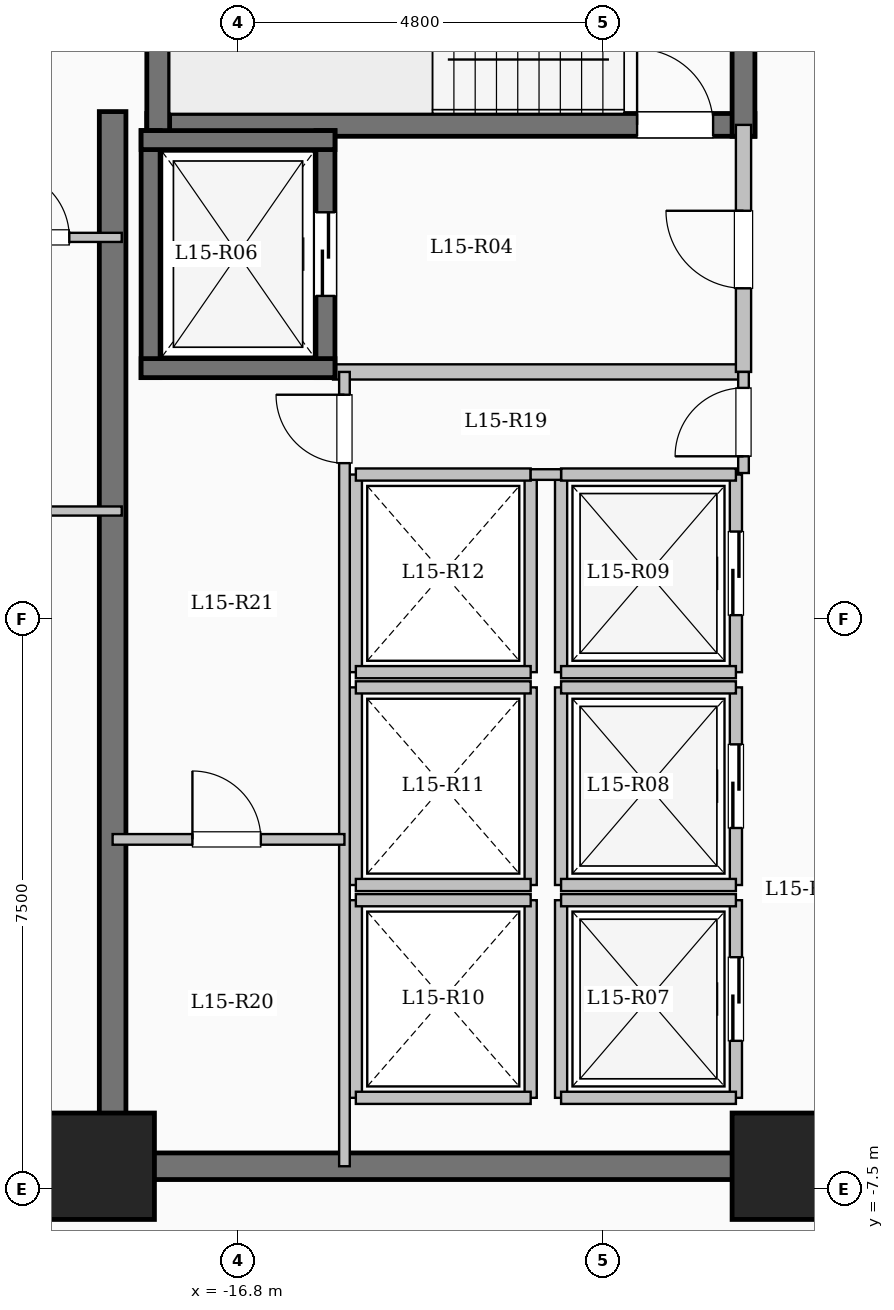
"""IFC4 building model, lengths in metres.
Left out: names, types, materials, properties, quantities, classifications, styles, units other than length and angle.
Written with IfcOpenShell. Run it as: python <this file> out.ifc"""

import sys

from ifc_helpers import new_model, si_unit, direction, frame, frame_2d, origin, origin_2d, place, context, subcontext, project, spatial, rectangle, extrude, element, fill, save


model = new_model("IFC4")
c1 = context("Model", 3, precision=1e-05, world=origin(), true_north=direction((0.0, 1.0)))
c2 = subcontext(c1, "Body", "Model", "MODEL_VIEW")
j1 = project(units=[si_unit("LENGTHUNIT", "METRE"), si_unit("PLANEANGLEUNIT", "RADIAN")], contexts=[c1])
p1 = place(None, origin())
s1 = spatial("IfcSite", under=j1, at=p1, CompositionType="ELEMENT")
p2 = place(p1, origin())
s2 = spatial("IfcBuilding", under=s1, at=p2, CompositionType="ELEMENT")
p3 = place(p2, frame((0.0, 0.0, 57.5)))
s3 = spatial("IfcBuildingStorey", under=s2, at=p3, CompositionType="ELEMENT", Elevation=57.5)
for number, where, z_axis, x_axis in (
    (1, (-9.6, -7.2, 0.0), (0.0, 0.0, 1.0), (1.0, 0.0, 0.0)),
    (2, (-18.6, -7.2, 0.0), (0.0, 0.0, 1.0), (1.0, 0.0, 0.0)),
):
    element("IfcColumn", number, at=place(p3, frame(where, z_axis=z_axis, x_axis=x_axis)), inside=s3, PredefinedType="COLUMN", context=c2, shape_type="SweptSolid", body=[
        extrude(rectangle(XDim=1.4, YDim=1.4, at=origin_2d()), origin(), (0.0, 0.0, 1.0), 3.35),
    ])
p4 = place(p3, frame((-18.0, 6.5, 0.0), z_axis=(0.0, 0.0, 1.0), x_axis=(1.0, 0.0, 0.0)))
e3 = element("IfcWall", 3, at=p4, inside=s3, PredefinedType="SHEAR", context=c2, shape_type="SweptSolid", body=[
    extrude(rectangle(XDim=8.0, YDim=0.3, at=frame_2d((4.0, 0.0))), origin(), (0.0, 0.0, 1.0), 3.35),
])
p5 = place(p4, frame((6.45, 0.0, 0.0)))
e4 = element("IfcOpeningElement", 4, at=p5, cuts=e3, PredefinedType="OPENING", context=c2, shape_type="SweptSolid", body=[
    extrude(rectangle(XDim=1.0, YDim=2.15, at=frame_2d((0.5, 1.075))), frame((0.0, 0.16, 0.0), z_axis=(0.0, -1.0, 0.0), x_axis=(1.0, 0.0, 0.0)), (0.0, 0.0, 1.0), 0.32),
])
for number, where, z_axis, x_axis in (
    (5, (-17.85, 6.35, 0.0), (0.0, 0.0, 1.0), (0.0, 1.0, 0.0)),
    (6, (-10.15, 6.35, 0.0), (0.0, 0.0, 1.0), (0.0, 1.0, 0.0)),
):
    element("IfcWall", number, at=place(p3, frame(where, z_axis=z_axis, x_axis=x_axis)), inside=s3, PredefinedType="SHEAR", context=c2, shape_type="SweptSolid", body=[
        extrude(rectangle(XDim=3.59, YDim=0.3, at=frame_2d((1.795, 0.0))), origin(), (0.0, 0.0, 1.0), 3.35),
    ])
p6 = place(p3, frame((-15.55, 3.25, 0.0), z_axis=(0.0, 0.0, 1.0), x_axis=(1.0, 0.0, 0.0)))
e7 = element("IfcWall", 7, at=p6, inside=s3, PredefinedType="SOLIDWALL", context=c2, shape_type="SweptSolid", body=[
    extrude(rectangle(XDim=5.4, YDim=0.2, at=frame_2d((2.7, 0.0))), origin(), (0.0, 0.0, 1.0), 3.1),
])
p7 = place(p3, frame((-10.15, 3.25, 0.0), z_axis=(0.0, 0.0, 1.0), x_axis=(0.0, 1.0, 0.0)))
e8 = element("IfcWall", 8, at=p7, inside=s3, PredefinedType="SOLIDWALL", context=c2, shape_type="SweptSolid", body=[
    extrude(rectangle(XDim=3.25, YDim=0.2, at=frame_2d((1.625, 0.0))), origin(), (0.0, 0.0, 1.0), 3.1),
])
p8 = place(p7, frame((1.1, 0.0, 0.0)))
e9 = element("IfcOpeningElement", 9, at=p8, cuts=e8, PredefinedType="OPENING", context=c2, shape_type="SweptSolid", body=[
    extrude(rectangle(XDim=1.02, YDim=2.15, at=frame_2d((0.51, 1.075))), frame((0.0, 0.11, 0.0), z_axis=(0.0, -1.0, 0.0), x_axis=(1.0, 0.0, 0.0)), (0.0, 0.0, 1.0), 0.22),
])
p9 = place(p3, frame((-17.95, 3.175, 0.0), z_axis=(0.0, 0.0, 1.0), x_axis=(0.0, 1.0, 0.0)))
e10 = element("IfcWall", 10, at=p9, inside=s3, PredefinedType="SHEAR", context=c2, shape_type="SweptSolid", body=[
    extrude(rectangle(XDim=3.25, YDim=0.25, at=frame_2d((1.625, 0.0))), origin(), (0.0, 0.0, 1.0), 3.35),
])
p10 = place(p3, frame((-15.65, 3.175, 0.0), z_axis=(0.0, 0.0, 1.0), x_axis=(0.0, 1.0, 0.0)))
e11 = element("IfcWall", 11, at=p10, inside=s3, PredefinedType="SHEAR", context=c2, shape_type="SweptSolid", body=[
    extrude(rectangle(XDim=3.25, YDim=0.25, at=frame_2d((1.625, 0.0))), origin(), (0.0, 0.0, 1.0), 3.35),
])
p11 = place(p10, frame((1.075, 0.0, 0.0)))
e12 = element("IfcOpeningElement", 12, at=p11, cuts=e11, PredefinedType="OPENING", context=c2, shape_type="SweptSolid", body=[
    extrude(rectangle(XDim=1.1, YDim=2.15, at=frame_2d((0.55, 1.075))), frame((0.0, 0.135, 0.0), z_axis=(0.0, -1.0, 0.0), x_axis=(1.0, 0.0, 0.0)), (0.0, 0.0, 1.0), 0.27),
])
for number, where, z_axis, x_axis in (
    (13, (-18.075, 3.3, 0.0), (0.0, 0.0, 1.0), (1.0, 0.0, 0.0)),
    (14, (-18.075, 6.3, 0.0), (0.0, 0.0, 1.0), (1.0, 0.0, 0.0)),
):
    element("IfcWall", number, at=place(p3, frame(where, z_axis=z_axis, x_axis=x_axis)), inside=s3, PredefinedType="SHEAR", context=c2, shape_type="SweptSolid", body=[
        extrude(rectangle(XDim=2.55, YDim=0.25, at=frame_2d((1.275, 0.0))), origin(), (0.0, 0.0, 1.0), 3.35),
    ])
p12 = place(p3, frame((-12.55, -6.3, 0.0), z_axis=(0.0, 0.0, 1.0), x_axis=(0.0, 1.0, 0.0)))
e15 = element("IfcWall", 15, at=p12, inside=s3, PredefinedType="SOLIDWALL", context=c2, shape_type="SweptSolid", body=[
    extrude(rectangle(XDim=2.6, YDim=0.16, at=frame_2d((1.3, 0.0))), origin(), (0.0, 0.0, 1.0), 3.1),
])
p13 = place(p3, frame((-10.25, -6.3, 0.0), z_axis=(0.0, 0.0, 1.0), x_axis=(0.0, 1.0, 0.0)))
e16 = element("IfcWall", 16, at=p13, inside=s3, PredefinedType="SOLIDWALL", context=c2, shape_type="SweptSolid", body=[
    extrude(rectangle(XDim=2.6, YDim=0.16, at=frame_2d((1.3, 0.0))), origin(), (0.0, 0.0, 1.0), 3.1),
])
p14 = place(p13, frame((0.75, 0.0, 0.0)))
e17 = element("IfcOpeningElement", 17, at=p14, cuts=e16, PredefinedType="OPENING", context=c2, shape_type="SweptSolid", body=[
    extrude(rectangle(XDim=1.1, YDim=2.15, at=frame_2d((0.55, 1.075))), frame((0.0, 0.09, 0.0), z_axis=(0.0, -1.0, 0.0), x_axis=(1.0, 0.0, 0.0)), (0.0, 0.0, 1.0), 0.18),
])
for number, where, z_axis, x_axis in (
    (18, (-12.55, -6.3, 0.0), (0.0, 0.0, 1.0), (1.0, 0.0, 0.0)),
    (19, (-12.55, -3.7, 0.0), (0.0, 0.0, 1.0), (1.0, 0.0, 0.0)),
):
    element("IfcWall", number, at=place(p3, frame(where, z_axis=z_axis, x_axis=x_axis)), inside=s3, PredefinedType="SOLIDWALL", context=c2, shape_type="SweptSolid", body=[
        extrude(rectangle(XDim=2.3, YDim=0.16, at=frame_2d((1.15, 0.0))), origin(), (0.0, 0.0, 1.0), 3.1),
    ])
p15 = place(p3, frame((-12.55, -3.5, 0.0), z_axis=(0.0, 0.0, 1.0), x_axis=(0.0, 1.0, 0.0)))
e20 = element("IfcWall", 20, at=p15, inside=s3, PredefinedType="SOLIDWALL", context=c2, shape_type="SweptSolid", body=[
    extrude(rectangle(XDim=2.6, YDim=0.16, at=frame_2d((1.3, 0.0))), origin(), (0.0, 0.0, 1.0), 3.1),
])
p16 = place(p3, frame((-10.25, -3.5, 0.0), z_axis=(0.0, 0.0, 1.0), x_axis=(0.0, 1.0, 0.0)))
e21 = element("IfcWall", 21, at=p16, inside=s3, PredefinedType="SOLIDWALL", context=c2, shape_type="SweptSolid", body=[
    extrude(rectangle(XDim=2.6, YDim=0.16, at=frame_2d((1.3, 0.0))), origin(), (0.0, 0.0, 1.0), 3.1),
])
p17 = place(p16, frame((0.75, 0.0, 0.0)))
e22 = element("IfcOpeningElement", 22, at=p17, cuts=e21, PredefinedType="OPENING", context=c2, shape_type="SweptSolid", body=[
    extrude(rectangle(XDim=1.1, YDim=2.15, at=frame_2d((0.55, 1.075))), frame((0.0, 0.09, 0.0), z_axis=(0.0, -1.0, 0.0), x_axis=(1.0, 0.0, 0.0)), (0.0, 0.0, 1.0), 0.18),
])
for number, where, z_axis, x_axis in (
    (23, (-12.55, -3.5, 0.0), (0.0, 0.0, 1.0), (1.0, 0.0, 0.0)),
    (24, (-12.55, -0.9, 0.0), (0.0, 0.0, 1.0), (1.0, 0.0, 0.0)),
):
    element("IfcWall", number, at=place(p3, frame(where, z_axis=z_axis, x_axis=x_axis)), inside=s3, PredefinedType="SOLIDWALL", context=c2, shape_type="SweptSolid", body=[
        extrude(rectangle(XDim=2.3, YDim=0.16, at=frame_2d((1.15, 0.0))), origin(), (0.0, 0.0, 1.0), 3.1),
    ])
p18 = place(p3, frame((-12.55, -0.7, 0.0), z_axis=(0.0, 0.0, 1.0), x_axis=(0.0, 1.0, 0.0)))
e25 = element("IfcWall", 25, at=p18, inside=s3, PredefinedType="SOLIDWALL", context=c2, shape_type="SweptSolid", body=[
    extrude(rectangle(XDim=2.6, YDim=0.16, at=frame_2d((1.3, 0.0))), origin(), (0.0, 0.0, 1.0), 3.1),
])
p19 = place(p3, frame((-10.25, -0.7, 0.0), z_axis=(0.0, 0.0, 1.0), x_axis=(0.0, 1.0, 0.0)))
e26 = element("IfcWall", 26, at=p19, inside=s3, PredefinedType="SOLIDWALL", context=c2, shape_type="SweptSolid", body=[
    extrude(rectangle(XDim=2.6, YDim=0.16, at=frame_2d((1.3, 0.0))), origin(), (0.0, 0.0, 1.0), 3.1),
])
p20 = place(p19, frame((0.75, 0.0, 0.0)))
e27 = element("IfcOpeningElement", 27, at=p20, cuts=e26, PredefinedType="OPENING", context=c2, shape_type="SweptSolid", body=[
    extrude(rectangle(XDim=1.1, YDim=2.15, at=frame_2d((0.55, 1.075))), frame((0.0, 0.09, 0.0), z_axis=(0.0, -1.0, 0.0), x_axis=(1.0, 0.0, 0.0)), (0.0, 0.0, 1.0), 0.18),
])
for number, where, z_axis, x_axis in (
    (28, (-12.55, -0.7, 0.0), (0.0, 0.0, 1.0), (1.0, 0.0, 0.0)),
    (29, (-12.55, 1.9, 0.0), (0.0, 0.0, 1.0), (1.0, 0.0, 0.0)),
):
    element("IfcWall", number, at=place(p3, frame(where, z_axis=z_axis, x_axis=x_axis)), inside=s3, PredefinedType="SOLIDWALL", context=c2, shape_type="SweptSolid", body=[
        extrude(rectangle(XDim=2.3, YDim=0.16, at=frame_2d((1.15, 0.0))), origin(), (0.0, 0.0, 1.0), 3.1),
    ])
for number, where, z_axis, x_axis in (
    (30, (-15.25, -6.3, 0.0), (0.0, 0.0, 1.0), (0.0, 1.0, 0.0)),
    (31, (-12.95, -6.3, 0.0), (0.0, 0.0, 1.0), (0.0, 1.0, 0.0)),
):
    element("IfcWall", number, at=place(p3, frame(where, z_axis=z_axis, x_axis=x_axis)), inside=s3, PredefinedType="SOLIDWALL", context=c2, shape_type="SweptSolid", body=[
        extrude(rectangle(XDim=2.6, YDim=0.16, at=frame_2d((1.3, 0.0))), origin(), (0.0, 0.0, 1.0), 3.1),
    ])
for number, where, z_axis, x_axis in (
    (32, (-15.25, -6.3, 0.0), (0.0, 0.0, 1.0), (1.0, 0.0, 0.0)),
    (33, (-15.25, -3.7, 0.0), (0.0, 0.0, 1.0), (1.0, 0.0, 0.0)),
):
    element("IfcWall", number, at=place(p3, frame(where, z_axis=z_axis, x_axis=x_axis)), inside=s3, PredefinedType="SOLIDWALL", context=c2, shape_type="SweptSolid", body=[
        extrude(rectangle(XDim=2.3, YDim=0.16, at=frame_2d((1.15, 0.0))), origin(), (0.0, 0.0, 1.0), 3.1),
    ])
for number, where, z_axis, x_axis in (
    (34, (-15.25, -3.5, 0.0), (0.0, 0.0, 1.0), (0.0, 1.0, 0.0)),
    (35, (-12.95, -3.5, 0.0), (0.0, 0.0, 1.0), (0.0, 1.0, 0.0)),
):
    element("IfcWall", number, at=place(p3, frame(where, z_axis=z_axis, x_axis=x_axis)), inside=s3, PredefinedType="SOLIDWALL", context=c2, shape_type="SweptSolid", body=[
        extrude(rectangle(XDim=2.6, YDim=0.16, at=frame_2d((1.3, 0.0))), origin(), (0.0, 0.0, 1.0), 3.1),
    ])
for number, where, z_axis, x_axis in (
    (36, (-15.25, -3.5, 0.0), (0.0, 0.0, 1.0), (1.0, 0.0, 0.0)),
    (37, (-15.25, -0.9, 0.0), (0.0, 0.0, 1.0), (1.0, 0.0, 0.0)),
):
    element("IfcWall", number, at=place(p3, frame(where, z_axis=z_axis, x_axis=x_axis)), inside=s3, PredefinedType="SOLIDWALL", context=c2, shape_type="SweptSolid", body=[
        extrude(rectangle(XDim=2.3, YDim=0.16, at=frame_2d((1.15, 0.0))), origin(), (0.0, 0.0, 1.0), 3.1),
    ])
for number, where, z_axis, x_axis in (
    (38, (-15.25, -0.7, 0.0), (0.0, 0.0, 1.0), (0.0, 1.0, 0.0)),
    (39, (-12.95, -0.7, 0.0), (0.0, 0.0, 1.0), (0.0, 1.0, 0.0)),
):
    element("IfcWall", number, at=place(p3, frame(where, z_axis=z_axis, x_axis=x_axis)), inside=s3, PredefinedType="SOLIDWALL", context=c2, shape_type="SweptSolid", body=[
        extrude(rectangle(XDim=2.6, YDim=0.16, at=frame_2d((1.3, 0.0))), origin(), (0.0, 0.0, 1.0), 3.1),
    ])
for number, where, z_axis, x_axis in (
    (40, (-15.25, -0.7, 0.0), (0.0, 0.0, 1.0), (1.0, 0.0, 0.0)),
    (41, (-15.25, 1.9, 0.0), (0.0, 0.0, 1.0), (1.0, 0.0, 0.0)),
):
    element("IfcWall", number, at=place(p3, frame(where, z_axis=z_axis, x_axis=x_axis)), inside=s3, PredefinedType="SOLIDWALL", context=c2, shape_type="SweptSolid", body=[
        extrude(rectangle(XDim=2.3, YDim=0.16, at=frame_2d((1.15, 0.0))), origin(), (0.0, 0.0, 1.0), 3.1),
    ])
p21 = place(p3, frame((-18.45, -7.375, 0.0), z_axis=(0.0, 0.0, 1.0), x_axis=(0.0, 1.0, 0.0)))
e42 = element("IfcWall", 42, at=p21, inside=s3, PredefinedType="SHEAR", context=c2, shape_type="SweptSolid", body=[
    extrude(rectangle(XDim=14.05, YDim=0.35, at=frame_2d((7.025, 0.0))), origin(), (0.0, 0.0, 1.0), 3.35),
])
p22 = place(p3, frame((-18.625, -7.2, 0.0), z_axis=(0.0, 0.0, 1.0), x_axis=(1.0, 0.0, 0.0)))
e43 = element("IfcWall", 43, at=p22, inside=s3, PredefinedType="SHEAR", context=c2, shape_type="SweptSolid", body=[
    extrude(rectangle(XDim=8.55, YDim=0.35, at=frame_2d((4.275, 0.0))), origin(), (0.0, 0.0, 1.0), 3.35),
])
p23 = place(p3, frame((-12.95, 1.9, 0.0), z_axis=(0.0, 0.0, 1.0), x_axis=(1.0, 0.0, 0.0)))
e44 = element("IfcWall", 44, at=p23, inside=s3, PredefinedType="PARTITIONING", context=c2, shape_type="SweptSolid", body=[
    extrude(rectangle(XDim=0.4, YDim=0.14, at=frame_2d((0.2, 0.0))), origin(), (0.0, 0.0, 1.0), 3.1),
])
p24 = place(p3, frame((-10.15, 1.92, 0.0), z_axis=(0.0, 0.0, 1.0), x_axis=(0.0, 1.0, 0.0)))
e45 = element("IfcWall", 45, at=p24, inside=s3, PredefinedType="PARTITIONING", context=c2, shape_type="SweptSolid", body=[
    extrude(rectangle(XDim=1.33, YDim=0.14, at=frame_2d((0.665, 0.0))), origin(), (0.0, 0.0, 1.0), 3.1),
])
p25 = place(p24, frame((0.22, 0.0, 0.0)))
e46 = element("IfcOpeningElement", 46, at=p25, cuts=e45, PredefinedType="OPENING", context=c2, shape_type="SweptSolid", body=[
    extrude(rectangle(XDim=0.9, YDim=2.08, at=frame_2d((0.45, 1.04))), frame((0.0, 0.08, 0.0), z_axis=(0.0, -1.0, 0.0), x_axis=(1.0, 0.0, 0.0)), (0.0, 0.0, 1.0), 0.16),
])
p26 = place(p3, frame((-15.4, -7.2, 0.0), z_axis=(0.0, 0.0, 1.0), x_axis=(0.0, 1.0, 0.0)))
e47 = element("IfcWall", 47, at=p26, inside=s3, PredefinedType="PARTITIONING", context=c2, shape_type="SweptSolid", body=[
    extrude(rectangle(XDim=10.45, YDim=0.14, at=frame_2d((5.225, 0.0))), origin(), (0.0, 0.0, 1.0), 3.1),
])
p27 = place(p26, frame((9.25, 0.0, 0.0)))
e48 = element("IfcOpeningElement", 48, at=p27, cuts=e47, PredefinedType="OPENING", context=c2, shape_type="SweptSolid", body=[
    extrude(rectangle(XDim=0.9, YDim=2.08, at=frame_2d((0.45, 1.04))), frame((0.0, 0.08, 0.0), z_axis=(0.0, -1.0, 0.0), x_axis=(1.0, 0.0, 0.0)), (0.0, 0.0, 1.0), 0.16),
])
p28 = place(p3, frame((-18.45, -2.9, 0.0), z_axis=(0.0, 0.0, 1.0), x_axis=(1.0, 0.0, 0.0)))
e49 = element("IfcWall", 49, at=p28, inside=s3, PredefinedType="PARTITIONING", context=c2, shape_type="SweptSolid", body=[
    extrude(rectangle(XDim=3.05, YDim=0.14, at=frame_2d((1.525, 0.0))), origin(), (0.0, 0.0, 1.0), 3.1),
])
p29 = place(p28, frame((1.05, 0.0, 0.0)))
e50 = element("IfcOpeningElement", 50, at=p29, cuts=e49, PredefinedType="OPENING", context=c2, shape_type="SweptSolid", body=[
    extrude(rectangle(XDim=0.9, YDim=2.08, at=frame_2d((0.45, 1.04))), frame((0.0, 0.08, 0.0), z_axis=(0.0, -1.0, 0.0), x_axis=(1.0, 0.0, 0.0)), (0.0, 0.0, 1.0), 0.16),
])
p30 = place(p3, frame((-28.68, -7.25, 0.0), z_axis=(0.0, 0.0, 1.0), x_axis=(1.0, 0.0, 0.0)))
e51 = element("IfcWall", 51, at=p30, inside=s3, PredefinedType="PARTITIONING", context=c2, shape_type="SweptSolid", body=[
    extrude(rectangle(XDim=10.23, YDim=0.15, at=frame_2d((5.115, 0.0))), origin(), (0.0, 0.0, 1.0), 3.1),
])
p31 = place(p30, frame((7.13, 0.0, 0.0)))
e52 = element("IfcOpeningElement", 52, at=p31, cuts=e51, PredefinedType="OPENING", context=c2, shape_type="SweptSolid", body=[
    extrude(rectangle(XDim=0.96, YDim=2.15, at=frame_2d((0.48, 1.075))), frame((0.0, 0.085, 0.0), z_axis=(0.0, -1.0, 0.0), x_axis=(1.0, 0.0, 0.0)), (0.0, 0.0, 1.0), 0.17),
])
p32 = place(p3, frame((-28.8, 1.42, 0.0), z_axis=(0.0, 0.0, 1.0), x_axis=(1.0, 0.0, 0.0)))
e53 = element("IfcWall", 53, at=p32, inside=s3, PredefinedType="PARTITIONING", context=c2, shape_type="SweptSolid", body=[
    extrude(rectangle(XDim=10.47, YDim=0.12, at=frame_2d((5.235, 0.0))), origin(), (0.0, 0.0, 1.0), 3.1),
])
p33 = place(p32, frame((2.213, 0.0, 0.0)))
e54 = element("IfcOpeningElement", 54, at=p33, cuts=e53, PredefinedType="OPENING", context=c2, shape_type="SweptSolid", body=[
    extrude(rectangle(XDim=0.88, YDim=2.1, at=frame_2d((0.44, 1.05))), frame((0.0, 0.07, 0.0), z_axis=(0.0, -1.0, 0.0), x_axis=(1.0, 0.0, 0.0)), (0.0, 0.0, 1.0), 0.14),
])
p34 = place(p32, frame((7.278, 0.0, 0.0)))
e55 = element("IfcOpeningElement", 55, at=p34, cuts=e53, PredefinedType="OPENING", context=c2, shape_type="SweptSolid", body=[
    extrude(rectangle(XDim=0.88, YDim=2.1, at=frame_2d((0.44, 1.05))), frame((0.0, 0.07, 0.0), z_axis=(0.0, -1.0, 0.0), x_axis=(1.0, 0.0, 0.0)), (0.0, 0.0, 1.0), 0.14),
])
p35 = place(p3, frame((-28.8, 5.02, 0.0), z_axis=(0.0, 0.0, 1.0), x_axis=(1.0, 0.0, 0.0)))
e56 = element("IfcWall", 56, at=p35, inside=s3, PredefinedType="PARTITIONING", context=c2, shape_type="SweptSolid", body=[
    extrude(rectangle(XDim=10.47, YDim=0.12, at=frame_2d((5.235, 0.0))), origin(), (0.0, 0.0, 1.0), 3.1),
])
p36 = place(p35, frame((8.9, 0.0, 0.0)))
e57 = element("IfcOpeningElement", 57, at=p36, cuts=e56, PredefinedType="OPENING", context=c2, shape_type="SweptSolid", body=[
    extrude(rectangle(XDim=0.88, YDim=2.1, at=frame_2d((0.44, 1.05))), frame((0.0, 0.07, 0.0), z_axis=(0.0, -1.0, 0.0), x_axis=(1.0, 0.0, 0.0)), (0.0, 0.0, 1.0), 0.14),
])
p37 = place(p5, origin())
e58 = element("IfcDoor", 58, at=p37, inside=s3, OperationType="SINGLE_SWING_LEFT", PredefinedType="DOOR", context=c2, shape_type="SweptSolid", body=[
    extrude(rectangle(XDim=1.0, YDim=2.15, at=frame_2d((0.5, 1.075))), frame((0.0, 0.025, 0.0), z_axis=(0.0, -1.0, 0.0), x_axis=(1.0, 0.0, 0.0)), (0.0, 0.0, 1.0), 0.05),
])
fill(e4, e58)
p38 = place(p8, origin())
e59 = element("IfcDoor", 59, at=p38, inside=s3, OperationType="SINGLE_SWING_RIGHT", PredefinedType="DOOR", context=c2, shape_type="SweptSolid", body=[
    extrude(rectangle(XDim=1.02, YDim=2.15, at=frame_2d((0.51, 1.075))), frame((0.0, 0.025, 0.0), z_axis=(0.0, -1.0, 0.0), x_axis=(1.0, 0.0, 0.0)), (0.0, 0.0, 1.0), 0.05),
])
fill(e9, e59)
p39 = place(p11, origin())
e60 = element("IfcDoor", 60, at=p39, inside=s3, OperationType="SLIDING_TO_LEFT", PredefinedType="DOOR", context=c2, shape_type="SweptSolid", body=[
    extrude(rectangle(XDim=1.1, YDim=2.15, at=frame_2d((0.55, 1.075))), frame((0.0, 0.025, 0.0), z_axis=(0.0, -1.0, 0.0), x_axis=(1.0, 0.0, 0.0)), (0.0, 0.0, 1.0), 0.05),
])
fill(e12, e60)
p40 = place(p14, origin())
e61 = element("IfcDoor", 61, at=p40, inside=s3, OperationType="SLIDING_TO_LEFT", PredefinedType="DOOR", context=c2, shape_type="SweptSolid", body=[
    extrude(rectangle(XDim=1.1, YDim=2.15, at=frame_2d((0.55, 1.075))), frame((0.0, 0.025, 0.0), z_axis=(0.0, -1.0, 0.0), x_axis=(1.0, 0.0, 0.0)), (0.0, 0.0, 1.0), 0.05),
])
fill(e17, e61)
p41 = place(p17, origin())
e62 = element("IfcDoor", 62, at=p41, inside=s3, OperationType="SLIDING_TO_LEFT", PredefinedType="DOOR", context=c2, shape_type="SweptSolid", body=[
    extrude(rectangle(XDim=1.1, YDim=2.15, at=frame_2d((0.55, 1.075))), frame((0.0, 0.025, 0.0), z_axis=(0.0, -1.0, 0.0), x_axis=(1.0, 0.0, 0.0)), (0.0, 0.0, 1.0), 0.05),
])
fill(e22, e62)
p42 = place(p20, origin())
e63 = element("IfcDoor", 63, at=p42, inside=s3, OperationType="SLIDING_TO_LEFT", PredefinedType="DOOR", context=c2, shape_type="SweptSolid", body=[
    extrude(rectangle(XDim=1.1, YDim=2.15, at=frame_2d((0.55, 1.075))), frame((0.0, 0.025, 0.0), z_axis=(0.0, -1.0, 0.0), x_axis=(1.0, 0.0, 0.0)), (0.0, 0.0, 1.0), 0.05),
])
fill(e27, e63)
p43 = place(p25, origin())
e64 = element("IfcDoor", 64, at=p43, inside=s3, OperationType="SINGLE_SWING_LEFT", PredefinedType="DOOR", context=c2, shape_type="SweptSolid", body=[
    extrude(rectangle(XDim=0.9, YDim=2.08, at=frame_2d((0.45, 1.04))), frame((0.0, 0.025, 0.0), z_axis=(0.0, -1.0, 0.0), x_axis=(1.0, 0.0, 0.0)), (0.0, 0.0, 1.0), 0.05),
])
fill(e46, e64)
p44 = place(p27, origin())
e65 = element("IfcDoor", 65, at=p44, inside=s3, OperationType="SINGLE_SWING_RIGHT", PredefinedType="DOOR", context=c2, shape_type="SweptSolid", body=[
    extrude(rectangle(XDim=0.9, YDim=2.08, at=frame_2d((0.45, 1.04))), frame((0.0, 0.025, 0.0), z_axis=(0.0, -1.0, 0.0), x_axis=(1.0, 0.0, 0.0)), (0.0, 0.0, 1.0), 0.05),
])
fill(e48, e65)
p45 = place(p29, origin())
e66 = element("IfcDoor", 66, at=p45, inside=s3, OperationType="SINGLE_SWING_LEFT", PredefinedType="DOOR", context=c2, shape_type="SweptSolid", body=[
    extrude(rectangle(XDim=0.9, YDim=2.08, at=frame_2d((0.45, 1.04))), frame((0.0, 0.025, 0.0), z_axis=(0.0, -1.0, 0.0), x_axis=(1.0, 0.0, 0.0)), (0.0, 0.0, 1.0), 0.05),
])
fill(e50, e66)
p46 = place(p36, origin())
e67 = element("IfcDoor", 67, at=p46, inside=s3, OperationType="SINGLE_SWING_LEFT", PredefinedType="DOOR", context=c2, shape_type="SweptSolid", body=[
    extrude(rectangle(XDim=0.88, YDim=2.1, at=frame_2d((0.44, 1.05))), frame((0.0, 0.025, 0.0), z_axis=(0.0, -1.0, 0.0), x_axis=(1.0, 0.0, 0.0)), (0.0, 0.0, 1.0), 0.05),
])
fill(e57, e67)
save(model, sys.argv[1])
